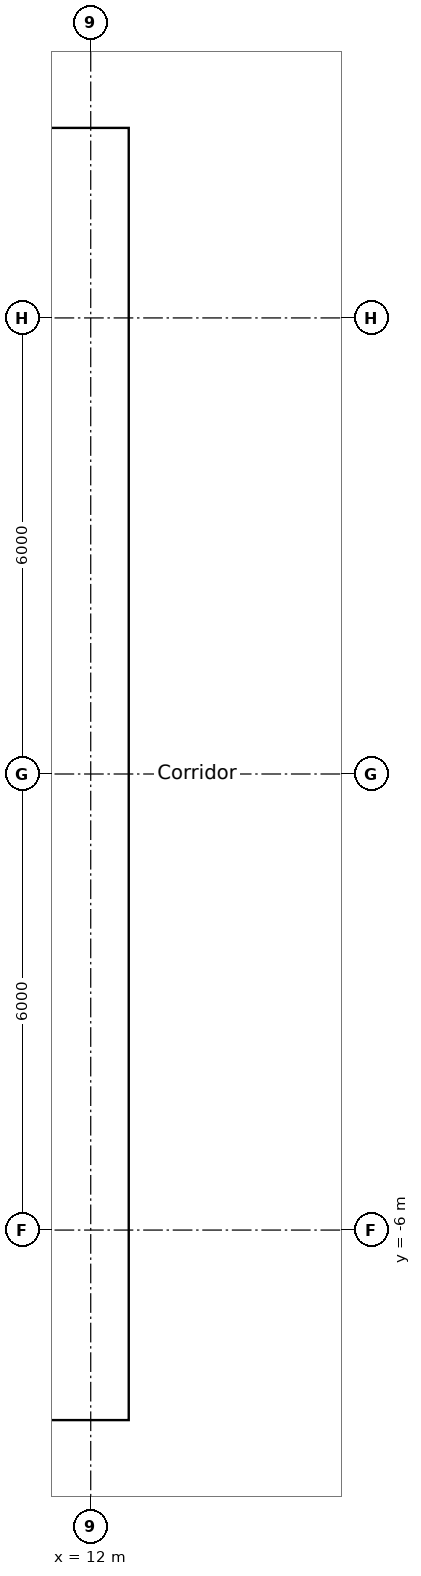
"""IFC4 building model, lengths in metres.
Left out: names, types, materials, properties, quantities, classifications, styles, units other than length and angle.
Written with IfcOpenShell. Run it as: python <this file> out.ifc"""

import sys

from ifc_helpers import new_model, si_unit, direction, frame, frame_2d, origin, place, context, subcontext, project, spatial, rectangle, extrude, element, fill, save


model = new_model("IFC4")
c1 = context("Model", 3, precision=1e-05, world=origin(), true_north=direction((0.0, 1.0)))
c2 = subcontext(c1, "Body", "Model", "MODEL_VIEW")
j1 = project(units=[si_unit("LENGTHUNIT", "METRE"), si_unit("PLANEANGLEUNIT", "RADIAN")], contexts=[c1])
p1 = place(None, origin())
s1 = spatial("IfcSite", under=j1, at=p1, CompositionType="ELEMENT")
p2 = place(p1, origin())
s2 = spatial("IfcBuilding", under=s1, at=p2, CompositionType="ELEMENT")
p3 = place(p2, frame((0.0, 0.0, 190.8)))
s3 = spatial("IfcBuildingStorey", under=s2, at=p3, CompositionType="ELEMENT", Elevation=190.8)
p4 = place(p3, frame((-12.5, -8.05, 0.0), z_axis=(0.0, 0.0, 1.0), x_axis=(1.0, 0.0, 0.0)))
e1 = element("IfcWall", 1, at=p4, inside=s3, PredefinedType="SOLIDWALL", context=c2, shape_type="SweptSolid", body=[
    extrude(rectangle(XDim=25.0, YDim=0.9, at=frame_2d((12.5, 0.0))), origin(), (0.0, 0.0, 1.0), 3.6),
])
p5 = place(p4, frame((13.4, 0.0, 0.0)))
e2 = element("IfcOpeningElement", 2, at=p5, cuts=e1, PredefinedType="OPENING", context=c2, shape_type="SweptSolid", body=[
    extrude(rectangle(XDim=1.0, YDim=2.1, at=frame_2d((0.5, 1.05))), frame((0.0, 0.45, 0.0), z_axis=(0.0, -1.0, 0.0), x_axis=(1.0, 0.0, 0.0)), (0.0, 0.0, 1.0), 0.9),
])
p6 = place(p4, frame((8.3, 0.0, 0.0)))
e3 = element("IfcOpeningElement", 3, at=p6, cuts=e1, PredefinedType="OPENING", context=c2, shape_type="SweptSolid", body=[
    extrude(rectangle(XDim=1.8, YDim=2.1, at=frame_2d((0.9, 1.05))), frame((0.0, 0.45, 0.0), z_axis=(0.0, -1.0, 0.0), x_axis=(1.0, 0.0, 0.0)), (0.0, 0.0, 1.0), 0.9),
])
p7 = place(p4, frame((14.9, 0.0, 0.0)))
e4 = element("IfcOpeningElement", 4, at=p7, cuts=e1, PredefinedType="OPENING", context=c2, shape_type="SweptSolid", body=[
    extrude(rectangle(XDim=1.8, YDim=2.1, at=frame_2d((0.9, 1.05))), frame((0.0, 0.45, 0.0), z_axis=(0.0, -1.0, 0.0), x_axis=(1.0, 0.0, 0.0)), (0.0, 0.0, 1.0), 0.9),
])
p8 = place(p3, frame((-12.5, 8.05, 0.0), z_axis=(0.0, 0.0, 1.0), x_axis=(1.0, 0.0, 0.0)))
e5 = element("IfcWall", 5, at=p8, inside=s3, PredefinedType="SOLIDWALL", context=c2, shape_type="SweptSolid", body=[
    extrude(rectangle(XDim=25.0, YDim=0.9, at=frame_2d((12.5, 0.0))), origin(), (0.0, 0.0, 1.0), 3.6),
])
p9 = place(p8, frame((8.3, 0.0, 0.0)))
e6 = element("IfcOpeningElement", 6, at=p9, cuts=e5, PredefinedType="OPENING", context=c2, shape_type="SweptSolid", body=[
    extrude(rectangle(XDim=1.8, YDim=2.1, at=frame_2d((0.9, 1.05))), frame((0.0, 0.45, 0.0), z_axis=(0.0, -1.0, 0.0), x_axis=(1.0, 0.0, 0.0)), (0.0, 0.0, 1.0), 0.9),
])
p10 = place(p3, frame((12.05, -7.6, 0.0), z_axis=(0.0, 0.0, 1.0), x_axis=(0.0, 1.0, 0.0)))
e7 = element("IfcWall", 7, at=p10, inside=s3, PredefinedType="SOLIDWALL", context=c2, shape_type="SweptSolid", body=[
    extrude(rectangle(XDim=15.2, YDim=0.9, at=frame_2d((7.6, 0.0))), origin(), (0.0, 0.0, 1.0), 3.6),
])
p11 = place(p10, frame((5.1, 0.0, 0.0)))
e8 = element("IfcOpeningElement", 8, at=p11, cuts=e7, PredefinedType="OPENING", context=c2, shape_type="SweptSolid", body=[
    extrude(rectangle(XDim=1.0, YDim=2.1, at=frame_2d((0.5, 1.05))), frame((0.0, 0.45, 0.0), z_axis=(0.0, -1.0, 0.0), x_axis=(1.0, 0.0, 0.0)), (0.0, 0.0, 1.0), 0.9),
])
p12 = place(p3, frame((9.2, -4.55, 0.0), z_axis=(0.0, 0.0, 1.0), x_axis=(1.0, 0.0, 0.0)))
e9 = element("IfcWall", 9, at=p12, inside=s3, PredefinedType="SOLIDWALL", context=c2, shape_type="SweptSolid", body=[
    extrude(rectangle(XDim=2.4, YDim=0.3, at=frame_2d((1.2, 0.0))), origin(), (0.0, 0.0, 1.0), 3.3),
])
p13 = place(p12, frame((0.65, 0.0, 0.0)))
e10 = element("IfcOpeningElement", 10, at=p13, cuts=e9, PredefinedType="OPENING", context=c2, shape_type="SweptSolid", body=[
    extrude(rectangle(XDim=1.1, YDim=2.1, at=frame_2d((0.55, 1.05))), frame((0.0, 0.15, 0.0), z_axis=(0.0, -1.0, 0.0), x_axis=(1.0, 0.0, 0.0)), (0.0, 0.0, 1.0), 0.3),
])
p14 = place(p3, frame((9.2, 4.55, 0.0), z_axis=(0.0, 0.0, 1.0), x_axis=(1.0, 0.0, 0.0)))
e11 = element("IfcWall", 11, at=p14, inside=s3, PredefinedType="SOLIDWALL", context=c2, shape_type="SweptSolid", body=[
    extrude(rectangle(XDim=2.4, YDim=0.3, at=frame_2d((1.2, 0.0))), origin(), (0.0, 0.0, 1.0), 3.3),
])
p15 = place(p14, frame((0.65, 0.0, 0.0)))
e12 = element("IfcOpeningElement", 12, at=p15, cuts=e11, PredefinedType="OPENING", context=c2, shape_type="SweptSolid", body=[
    extrude(rectangle(XDim=1.1, YDim=2.1, at=frame_2d((0.55, 1.05))), frame((0.0, 0.15, 0.0), z_axis=(0.0, -1.0, 0.0), x_axis=(1.0, 0.0, 0.0)), (0.0, 0.0, 1.0), 0.3),
])
p16 = place(p3, frame((15.235, 12.784, 0.0), z_axis=(0.0, 0.0, 1.0), x_axis=(0.499914202267, -0.866074933462, 0.0)))
e13 = element("IfcWall", 13, at=p16, inside=s3, PredefinedType="PARTITIONING", context=c2, shape_type="SweptSolid", body=[
    extrude(rectangle(XDim=6.907, YDim=0.15, at=frame_2d((3.454, 0.0))), origin(), (0.0, 0.0, 1.0), 3.3),
])
p17 = place(p16, frame((3.004, 0.0, 0.0)))
e14 = element("IfcOpeningElement", 14, at=p17, cuts=e13, PredefinedType="OPENING", context=c2, shape_type="SweptSolid", body=[
    extrude(rectangle(XDim=1.8, YDim=2.1, at=frame_2d((0.9, 1.05))), frame((0.0, 0.075, 0.0), z_axis=(0.0, -1.0, 0.0), x_axis=(1.0, 0.0, 0.0)), (0.0, 0.0, 1.0), 0.15),
])
p18 = place(p3, frame((15.235, -12.784, 0.0), z_axis=(0.0, 0.0, 1.0), x_axis=(0.499982531118, 0.866035489213, 0.0)))
e15 = element("IfcWall", 15, at=p18, inside=s3, PredefinedType="PARTITIONING", context=c2, shape_type="SweptSolid", body=[
    extrude(rectangle(XDim=6.907, YDim=0.15, at=frame_2d((3.454, 0.0))), origin(), (0.0, 0.0, 1.0), 3.3),
])
p19 = place(p18, frame((3.041, 0.0, 0.0)))
e16 = element("IfcOpeningElement", 16, at=p19, cuts=e15, PredefinedType="OPENING", context=c2, shape_type="SweptSolid", body=[
    extrude(rectangle(XDim=1.0, YDim=2.1, at=frame_2d((0.5, 1.05))), frame((0.0, 0.075, 0.0), z_axis=(0.0, -1.0, 0.0), x_axis=(1.0, 0.0, 0.0)), (0.0, 0.0, 1.0), 0.15),
])
p20 = place(p18, frame((5.249, 0.0, 0.0)))
e17 = element("IfcOpeningElement", 17, at=p20, cuts=e15, PredefinedType="OPENING", context=c2, shape_type="SweptSolid", body=[
    extrude(rectangle(XDim=1.0, YDim=2.1, at=frame_2d((0.5, 1.05))), frame((0.0, 0.075, 0.0), z_axis=(0.0, -1.0, 0.0), x_axis=(1.0, 0.0, 0.0)), (0.0, 0.0, 1.0), 0.15),
])
p21 = place(p11, origin())
e18 = element("IfcDoor", 18, at=p21, inside=s3, OperationType="DOUBLE_DOOR_SINGLE_SWING", PredefinedType="DOOR", context=c2, shape_type="SweptSolid", body=[
    extrude(rectangle(XDim=1.0, YDim=2.1, at=frame_2d((0.5, 1.05))), frame((0.0, 0.025, 0.0), z_axis=(0.0, -1.0, 0.0), x_axis=(1.0, 0.0, 0.0)), (0.0, 0.0, 1.0), 0.05),
])
fill(e8, e18)
save(model, sys.argv[1])
